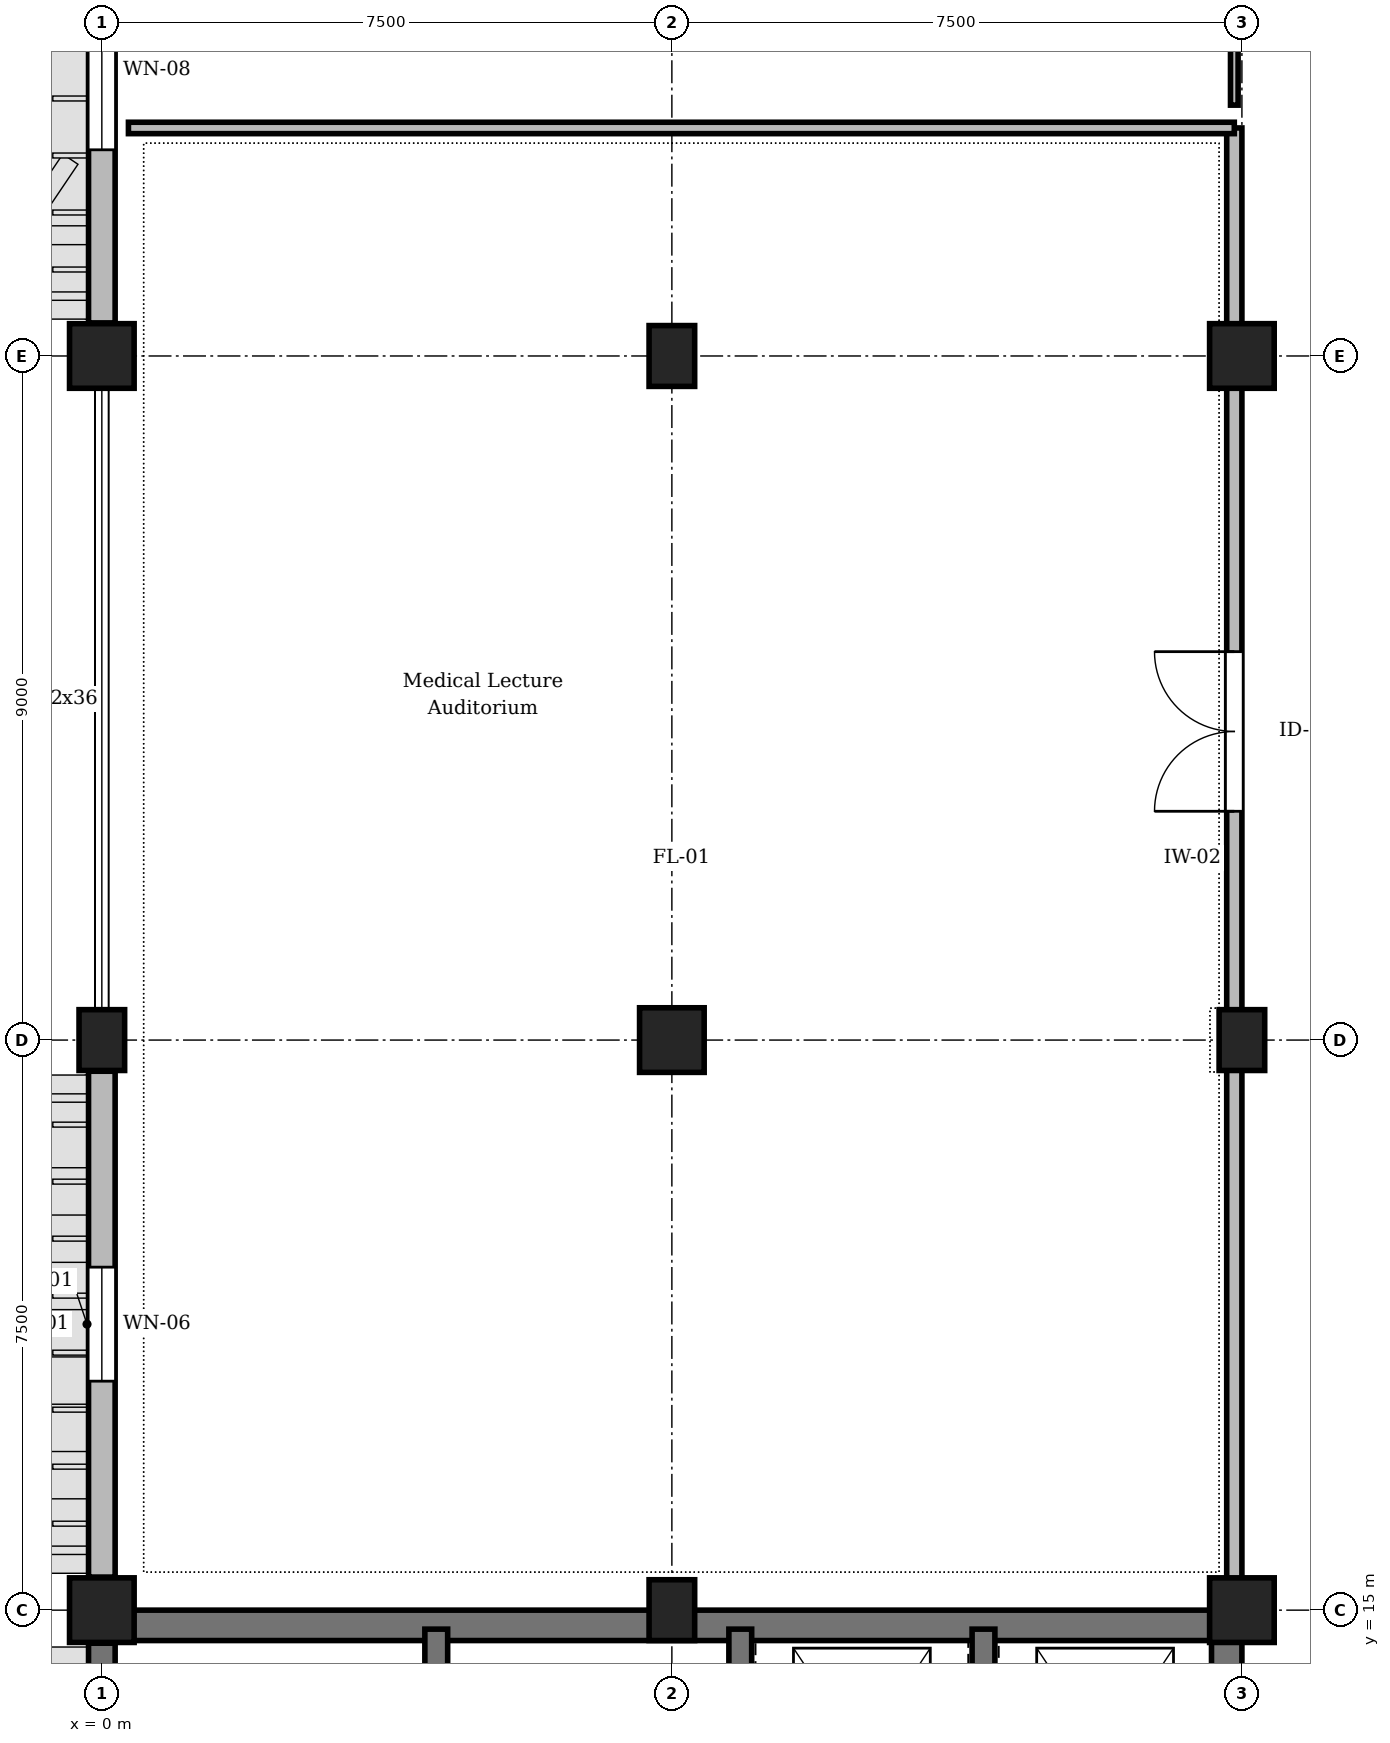
"""IFC4 building model, lengths in metres.
Left out: names, types, materials, properties, quantities, classifications, styles, units other than length and angle.
Written with IfcOpenShell. Run it as: python <this file> out.ifc"""

import sys

from ifc_helpers import new_model, si_unit, direction, frame, frame_2d, origin, origin_2d, place, context, subcontext, project, spatial, rectangle, extrude, element, fill, save


model = new_model("IFC4")
c1 = context("Model", 3, precision=1e-05, world=origin(), true_north=direction((0.0, 1.0)))
c2 = subcontext(c1, "Body", "Model", "MODEL_VIEW")
j1 = project(units=[si_unit("LENGTHUNIT", "METRE"), si_unit("PLANEANGLEUNIT", "RADIAN")], contexts=[c1])
p1 = place(None, origin())
s1 = spatial("IfcSite", under=j1, at=p1, CompositionType="ELEMENT")
p2 = place(p1, origin())
s2 = spatial("IfcBuilding", under=s1, at=p2, CompositionType="ELEMENT")
p3 = place(p2, frame((0.0, 0.0, 4.8)))
s3 = spatial("IfcBuildingStorey", under=s2, at=p3, CompositionType="ELEMENT", Elevation=4.8)
p4 = place(p3, frame((0.0, 15.0, 0.0), z_axis=(0.0, 0.0, 1.0), x_axis=(1.0, 0.0, 0.0)))
e1 = element("IfcColumn", 1, at=p4, inside=s3, PredefinedType="COLUMN", context=c2, shape_type="SweptSolid", body=[
    extrude(rectangle(XDim=0.85, YDim=0.85, at=origin_2d()), origin(), (0.0, 0.0, 1.0), 4.5),
])
p5 = place(p3, frame((0.0, 22.5, 0.0), z_axis=(0.0, 0.0, 1.0), x_axis=(1.0, 0.0, 0.0)))
e2 = element("IfcColumn", 2, at=p5, inside=s3, PredefinedType="COLUMN", context=c2, shape_type="SweptSolid", body=[
    extrude(rectangle(XDim=0.6, YDim=0.8, at=origin_2d()), origin(), (0.0, 0.0, 1.0), 4.5),
])
p6 = place(p3, frame((0.0, 31.5, 0.0), z_axis=(0.0, 0.0, 1.0), x_axis=(1.0, 0.0, 0.0)))
e3 = element("IfcColumn", 3, at=p6, inside=s3, PredefinedType="COLUMN", context=c2, shape_type="SweptSolid", body=[
    extrude(rectangle(XDim=0.85, YDim=0.85, at=origin_2d()), origin(), (0.0, 0.0, 1.0), 4.5),
])
p7 = place(p3, frame((7.5, 15.0, 0.0), z_axis=(0.0, 0.0, 1.0), x_axis=(1.0, 0.0, 0.0)))
e4 = element("IfcColumn", 4, at=p7, inside=s3, PredefinedType="COLUMN", context=c2, shape_type="SweptSolid", body=[
    extrude(rectangle(XDim=0.6, YDim=0.8, at=origin_2d()), origin(), (0.0, 0.0, 1.0), 4.5),
])
p8 = place(p3, frame((7.5, 22.5, 0.0), z_axis=(0.0, 0.0, 1.0), x_axis=(1.0, 0.0, 0.0)))
e5 = element("IfcColumn", 5, at=p8, inside=s3, PredefinedType="COLUMN", context=c2, shape_type="SweptSolid", body=[
    extrude(rectangle(XDim=0.85, YDim=0.85, at=origin_2d()), origin(), (0.0, 0.0, 1.0), 4.5),
])
p9 = place(p3, frame((7.5, 31.5, 0.0), z_axis=(0.0, 0.0, 1.0), x_axis=(1.0, 0.0, 0.0)))
e6 = element("IfcColumn", 6, at=p9, inside=s3, PredefinedType="COLUMN", context=c2, shape_type="SweptSolid", body=[
    extrude(rectangle(XDim=0.6, YDim=0.8, at=origin_2d()), origin(), (0.0, 0.0, 1.0), 4.5),
])
p10 = place(p3, frame((15.0, 15.0, 0.0), z_axis=(0.0, 0.0, 1.0), x_axis=(1.0, 0.0, 0.0)))
e7 = element("IfcColumn", 7, at=p10, inside=s3, PredefinedType="COLUMN", context=c2, shape_type="SweptSolid", body=[
    extrude(rectangle(XDim=0.85, YDim=0.85, at=origin_2d()), origin(), (0.0, 0.0, 1.0), 4.5),
])
p11 = place(p3, frame((15.0, 22.5, 0.0), z_axis=(0.0, 0.0, 1.0), x_axis=(1.0, 0.0, 0.0)))
e8 = element("IfcColumn", 8, at=p11, inside=s3, PredefinedType="COLUMN", context=c2, shape_type="SweptSolid", body=[
    extrude(rectangle(XDim=0.6, YDim=0.8, at=origin_2d()), origin(), (0.0, 0.0, 1.0), 4.5),
])
p12 = place(p3, frame((15.0, 31.5, 0.0), z_axis=(0.0, 0.0, 1.0), x_axis=(1.0, 0.0, 0.0)))
e9 = element("IfcColumn", 9, at=p12, inside=s3, PredefinedType="COLUMN", context=c2, shape_type="SweptSolid", body=[
    extrude(rectangle(XDim=0.85, YDim=0.85, at=origin_2d()), origin(), (0.0, 0.0, 1.0), 4.5),
])
p13 = place(p3, frame((0.0, 7.91, 0.0), z_axis=(0.0, 0.0, 1.0), x_axis=(0.0, 1.0, 0.0)))
e10 = element("IfcWall", 10, at=p13, inside=s3, PredefinedType="SHEAR", context=c2, shape_type="SweptSolid", body=[
    extrude(rectangle(XDim=6.655, YDim=0.35, at=frame_2d((3.328, 0.0))), origin(), (0.0, 0.0, 1.0), 4.18),
])
p14 = place(p3, frame((0.0, 15.435, 0.0), z_axis=(0.0, 0.0, 1.0), x_axis=(0.0, 1.0, 0.0)))
e11 = element("IfcWall", 11, at=p14, inside=s3, PredefinedType="STANDARD", context=c2, shape_type="SweptSolid", body=[
    extrude(rectangle(XDim=6.655, YDim=0.35, at=frame_2d((3.328, 0.0))), origin(), (0.0, 0.0, 1.0), 3.63),
])
p15 = place(p14, frame((2.577, 0.0, 0.9)))
e12 = element("IfcOpeningElement", 12, at=p15, cuts=e11, PredefinedType="OPENING", context=c2, shape_type="SweptSolid", body=[
    extrude(rectangle(XDim=1.5, YDim=2.1, at=frame_2d((0.75, 1.05))), frame((0.0, 0.185, 0.0), z_axis=(0.0, -1.0, 0.0), x_axis=(1.0, 0.0, 0.0)), (0.0, 0.0, 1.0), 0.37),
])
p16 = place(p3, frame((0.0, 31.935, 0.0), z_axis=(0.0, 0.0, 1.0), x_axis=(0.0, 1.0, 0.0)))
e13 = element("IfcWall", 13, at=p16, inside=s3, PredefinedType="STANDARD", context=c2, shape_type="SweptSolid", body=[
    extrude(rectangle(XDim=6.655, YDim=0.35, at=frame_2d((3.328, 0.0))), origin(), (0.0, 0.0, 1.0), 3.63),
])
p17 = place(p16, frame((2.278, 0.0, 0.9)))
e14 = element("IfcOpeningElement", 14, at=p17, cuts=e13, PredefinedType="OPENING", context=c2, shape_type="SweptSolid", body=[
    extrude(rectangle(XDim=2.1, YDim=2.1, at=frame_2d((1.05, 1.05))), frame((0.0, 0.185, 0.0), z_axis=(0.0, -1.0, 0.0), x_axis=(1.0, 0.0, 0.0)), (0.0, 0.0, 1.0), 0.37),
])
p18 = place(p3, frame((0.35, 14.8, 0.0), z_axis=(0.0, 0.0, 1.0), x_axis=(1.0, 0.0, 0.0)))
e15 = element("IfcWall", 15, at=p18, inside=s3, PredefinedType="SHEAR", context=c2, shape_type="SweptSolid", body=[
    extrude(rectangle(XDim=14.3, YDim=0.4, at=frame_2d((7.15, 0.0))), origin(), (0.0, 0.0, 1.0), 4.18),
])
p19 = place(p3, frame((14.8, 11.6, 0.0), z_axis=(0.0, 0.0, 1.0), x_axis=(0.0, 1.0, 0.0)))
e16 = element("IfcWall", 16, at=p19, inside=s3, PredefinedType="SHEAR", context=c2, shape_type="SweptSolid", body=[
    extrude(rectangle(XDim=3.05, YDim=0.4, at=frame_2d((1.525, 0.0))), origin(), (0.0, 0.0, 1.0), 4.18),
])
for number, where, z_axis, x_axis in (
    (17, (4.4, 11.6, 0.0), (0.0, 0.0, 1.0), (0.0, 1.0, 0.0)),
    (18, (8.4, 11.6, 0.0), (0.0, 0.0, 1.0), (0.0, 1.0, 0.0)),
    (19, (11.6, 11.6, 0.0), (0.0, 0.0, 1.0), (0.0, 1.0, 0.0)),
):
    element("IfcWall", number, at=place(p3, frame(where, z_axis=z_axis, x_axis=x_axis)), inside=s3, PredefinedType="SHEAR", context=c2, shape_type="SweptSolid", body=[
        extrude(rectangle(XDim=3.15, YDim=0.3, at=frame_2d((1.575, 0.0))), origin(), (0.0, 0.0, 1.0), 4.18),
    ])
p20 = place(p3, frame((14.9, 15.3, 0.0), z_axis=(0.0, 0.0, 1.0), x_axis=(0.0, 1.0, 0.0)))
e20 = element("IfcWall", 20, at=p20, inside=s3, PredefinedType="STANDARD", context=c2, shape_type="SweptSolid", body=[
    extrude(rectangle(XDim=19.2, YDim=0.2, at=frame_2d((9.6, 0.0))), origin(), (0.0, 0.0, 1.0), 3.465),
])
p21 = place(p20, frame((10.21, 0.0, 0.0)))
e21 = element("IfcOpeningElement", 21, at=p21, cuts=e20, PredefinedType="OPENING", context=c2, shape_type="SweptSolid", body=[
    extrude(rectangle(XDim=2.1, YDim=2.4, at=frame_2d((1.05, 1.2))), frame((0.0, 0.11, 0.0), z_axis=(0.0, -1.0, 0.0), x_axis=(1.0, 0.0, 0.0)), (0.0, 0.0, 1.0), 0.22),
])
p22 = place(p3, frame((14.9, 34.8, 0.0), z_axis=(0.0, 0.0, 1.0), x_axis=(0.0, 1.0, 0.0)))
e22 = element("IfcWall", 22, at=p22, inside=s3, PredefinedType="PARTITIONING", context=c2, shape_type="SweptSolid", body=[
    extrude(rectangle(XDim=18.9, YDim=0.1, at=frame_2d((9.45, 0.0))), origin(), (0.0, 0.0, 1.0), 3.565),
])
p23 = place(p22, frame((7.19, 0.0, 0.0)))
e23 = element("IfcOpeningElement", 23, at=p23, cuts=e22, PredefinedType="OPENING", context=c2, shape_type="SweptSolid", body=[
    extrude(rectangle(XDim=1.05, YDim=2.2, at=frame_2d((0.525, 1.1))), frame((0.0, 0.06, 0.0), z_axis=(0.0, -1.0, 0.0), x_axis=(1.0, 0.0, 0.0)), (0.0, 0.0, 1.0), 0.12),
])
p24 = place(p3, frame((0.35, 34.5, 0.0), z_axis=(0.0, 0.0, 1.0), x_axis=(1.0, 0.0, 0.0)))
e24 = element("IfcWall", 24, at=p24, inside=s3, PredefinedType="PARTITIONING", context=c2, shape_type="SweptSolid", body=[
    extrude(rectangle(XDim=14.55, YDim=0.15, at=frame_2d((7.275, 0.0))), origin(), (0.0, 0.0, 1.0), 4.165),
])
p25 = place(p15, origin())
e25 = element("IfcWindow", 25, at=p25, inside=s3, PartitioningType="SINGLE_PANEL", PredefinedType="WINDOW", context=c2, shape_type="SweptSolid", body=[
    extrude(rectangle(XDim=1.5, YDim=2.1, at=frame_2d((0.75, 1.05))), frame((0.0, 0.03, 0.0), z_axis=(0.0, -1.0, 0.0), x_axis=(1.0, 0.0, 0.0)), (0.0, 0.0, 1.0), 0.06),
])
fill(e12, e25)
p26 = place(p17, origin())
e26 = element("IfcWindow", 26, at=p26, inside=s3, PartitioningType="SINGLE_PANEL", PredefinedType="WINDOW", context=c2, shape_type="SweptSolid", body=[
    extrude(rectangle(XDim=2.1, YDim=2.1, at=frame_2d((1.05, 1.05))), frame((0.0, 0.03, 0.0), z_axis=(0.0, -1.0, 0.0), x_axis=(1.0, 0.0, 0.0)), (0.0, 0.0, 1.0), 0.06),
])
fill(e14, e26)
p27 = place(p21, origin())
e27 = element("IfcDoor", 27, at=p27, inside=s3, OperationType="DOUBLE_DOOR_SINGLE_SWING", PredefinedType="DOOR", context=c2, shape_type="SweptSolid", body=[
    extrude(rectangle(XDim=2.1, YDim=2.4, at=frame_2d((1.05, 1.2))), frame((0.0, 0.025, 0.0), z_axis=(0.0, -1.0, 0.0), x_axis=(1.0, 0.0, 0.0)), (0.0, 0.0, 1.0), 0.05),
])
fill(e21, e27)
save(model, sys.argv[1])
